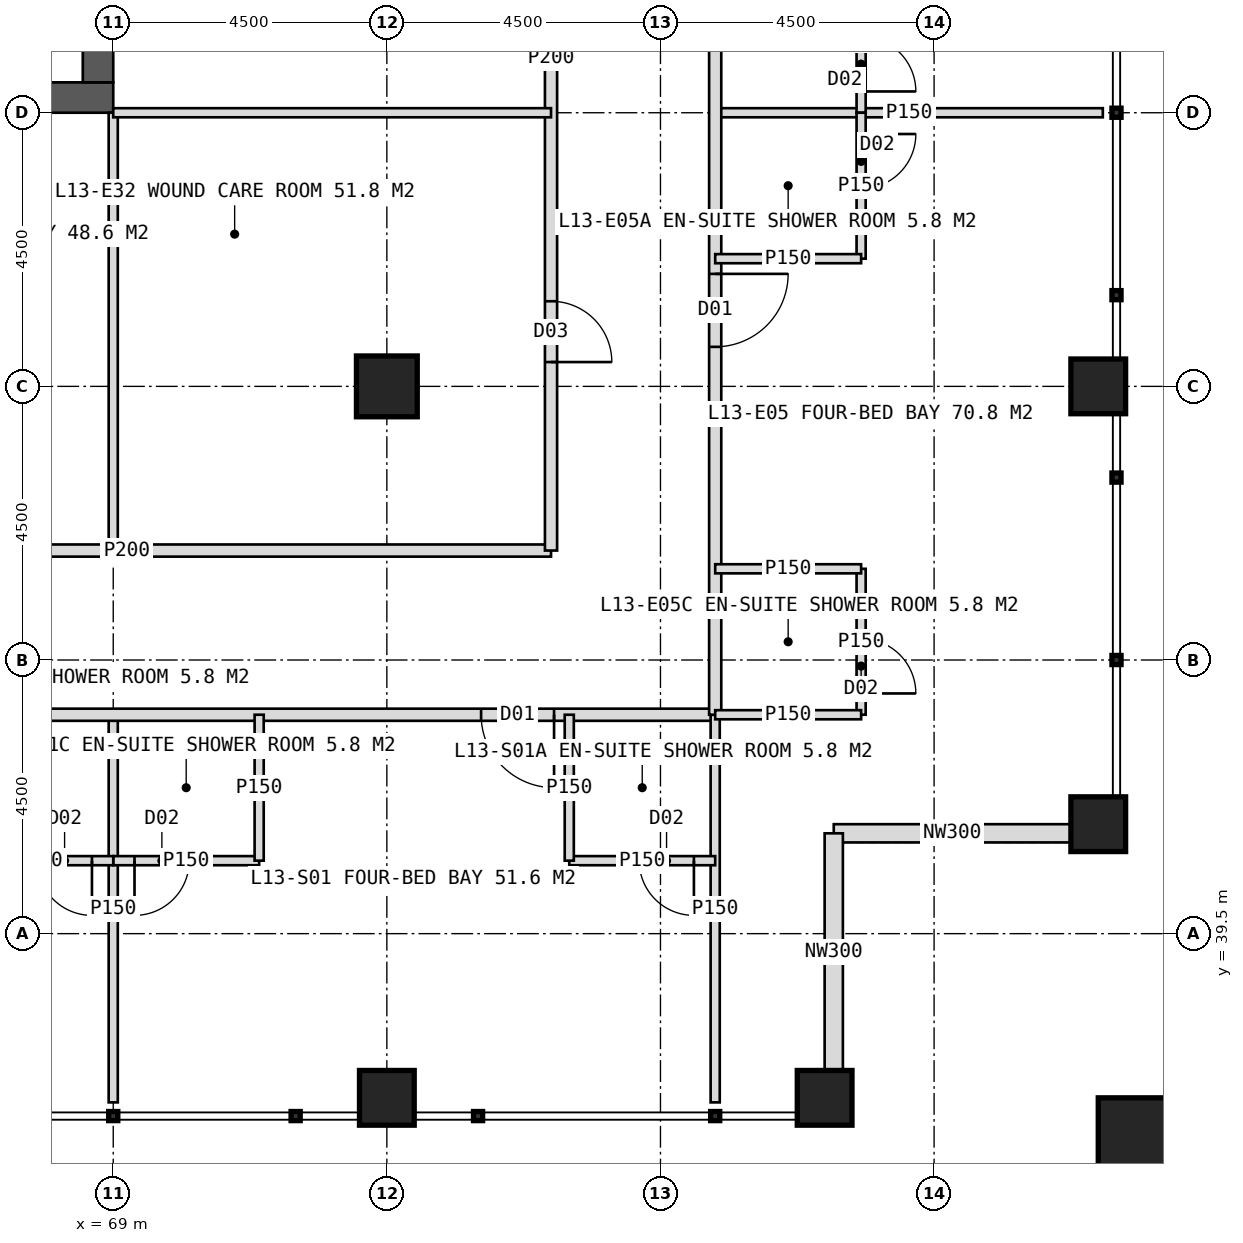
"""IFC4 building model, lengths in metres.
Left out: names, types, materials, properties, quantities, classifications, styles, units other than length and angle.
Written with IfcOpenShell. Run it as: python <this file> out.ifc"""

import sys

from ifc_helpers import new_model, si_unit, direction, frame, frame_2d, origin, origin_2d, place, context, subcontext, project, spatial, rectangle, hollow_rectangle, extrude, element, fill, save


model = new_model("IFC4")
c1 = context("Model", 3, precision=1e-05, world=origin(), true_north=direction((0.0, 1.0)))
c2 = subcontext(c1, "Body", "Model", "MODEL_VIEW")
j1 = project(units=[si_unit("LENGTHUNIT", "METRE"), si_unit("PLANEANGLEUNIT", "RADIAN")], contexts=[c1])
p1 = place(None, origin())
s1 = spatial("IfcSite", under=j1, at=p1, CompositionType="ELEMENT")
p2 = place(p1, origin())
s2 = spatial("IfcBuilding", under=s1, at=p2, CompositionType="ELEMENT")
p3 = place(p2, frame((0.0, 0.0, 59.0)))
s3 = spatial("IfcBuildingStorey", under=s2, at=p3, CompositionType="ELEMENT", Elevation=59.0)
p4 = place(p3, frame((51.0, 53.25, 0.0), z_axis=(0.0, 0.0, 1.0), x_axis=(1.0, 0.0, 0.0)))
e1 = element("IfcWall", 1, at=p4, inside=s3, PredefinedType="SHEAR", context=c2, shape_type="SweptSolid", body=[
    extrude(rectangle(XDim=18.0, YDim=0.5, at=frame_2d((9.0, 0.0))), origin(), (0.0, 0.0, 1.0), 4.0),
])
p5 = place(p4, frame((8.1, 0.0, 0.0)))
e2 = element("IfcOpeningElement", 2, at=p5, cuts=e1, PredefinedType="OPENING", context=c2, shape_type="SweptSolid", body=[
    extrude(rectangle(XDim=1.8, YDim=2.2, at=frame_2d((0.9, 1.1))), frame((0.0, 0.26, 0.0), z_axis=(0.0, -1.0, 0.0), x_axis=(1.0, 0.0, 0.0)), (0.0, 0.0, 1.0), 0.52),
])
p6 = place(p3, frame((68.75, 53.5, 0.0), z_axis=(0.0, 0.0, 1.0), x_axis=(0.0, 1.0, 0.0)))
e3 = element("IfcWall", 3, at=p6, inside=s3, PredefinedType="SHEAR", context=c2, shape_type="SweptSolid", body=[
    extrude(rectangle(XDim=17.0, YDim=0.5, at=frame_2d((8.5, 0.0))), origin(), (0.0, 0.0, 1.0), 4.0),
])
p7 = place(p6, frame((9.5, 0.0, 0.0)))
e4 = element("IfcOpeningElement", 4, at=p7, cuts=e3, PredefinedType="OPENING", context=c2, shape_type="SweptSolid", body=[
    extrude(rectangle(XDim=1.5, YDim=2.2, at=frame_2d((0.75, 1.1))), frame((0.0, 0.26, 0.0), z_axis=(0.0, -1.0, 0.0), x_axis=(1.0, 0.0, 0.0)), (0.0, 0.0, 1.0), 0.52),
])
p8 = place(p3, frame((73.5, 48.5, 0.0), z_axis=(0.0, 0.0, 1.0), x_axis=(1.0, 0.0, 0.0)))
e5 = element("IfcColumn", 5, at=p8, inside=s3, PredefinedType="COLUMN", context=c2, shape_type="SweptSolid", body=[
    extrude(hollow_rectangle(XDim=1.0, YDim=1.0, WallThickness=0.1, at=origin_2d()), origin(), (0.0, 0.0, 1.0), 4.0),
])
for number, where, z_axis, x_axis in (
    (6, (85.2, 41.3, 0.0), (0.0, 0.0, 1.0), (1.0, 0.0, 0.0)),
    (7, (85.2, 48.5, 0.0), (0.0, 0.0, 1.0), (1.0, 0.0, 0.0)),
    (8, (73.5, 36.8, 0.0), (0.0, 0.0, 1.0), (1.0, 0.0, 0.0)),
    (9, (80.7, 36.8, 0.0), (0.0, 0.0, 1.0), (1.0, 0.0, 0.0)),
):
    element("IfcColumn", number, at=place(p3, frame(where, z_axis=z_axis, x_axis=x_axis)), inside=s3, PredefinedType="COLUMN", context=c2, shape_type="SweptSolid", body=[
        extrude(hollow_rectangle(XDim=0.9, YDim=0.9, WallThickness=0.08, at=origin_2d()), origin(), (0.0, 0.0, 1.0), 4.0),
    ])
p9 = place(p3, frame((86.1, 35.9, 0.0), z_axis=(0.0, 0.0, 1.0), x_axis=(1.0, 0.0, 0.0)))
e10 = element("IfcColumn", 10, at=p9, inside=s3, PredefinedType="COLUMN", context=c2, shape_type="SweptSolid", body=[
    extrude(hollow_rectangle(XDim=1.8, YDim=1.8, WallThickness=0.1, at=origin_2d()), origin(), (0.0, 0.0, 1.0), 4.0),
])
for number, where, z_axis, x_axis in (
    (11, (84.75, 41.15, 0.0), (0.0, 0.0, 1.0), (-1.0, 0.0, 0.0)),
    (12, (80.85, 41.15, 0.0), (0.0, 0.0, 1.0), (0.0, -1.0, 0.0)),
):
    element("IfcWall", number, at=place(p3, frame(where, z_axis=z_axis, x_axis=x_axis)), inside=s3, PredefinedType="ELEMENTEDWALL", context=c2, shape_type="SweptSolid", body=[
        extrude(rectangle(XDim=3.9, YDim=0.3, at=frame_2d((1.95, 0.0))), origin(), (0.0, 0.0, 1.0), 2.95),
    ])
p10 = place(p3, frame((69.0, 43.1, 0.0), z_axis=(0.0, 0.0, 1.0), x_axis=(0.0, -1.0, 0.0)))
e13 = element("IfcWall", 13, at=p10, inside=s3, PredefinedType="PARTITIONING", context=c2, shape_type="SweptSolid", body=[
    extrude(rectangle(XDim=6.375, YDim=0.15, at=frame_2d((3.188, 0.0))), origin(), (0.0, 0.0, 1.0), 3.75),
])
p11 = place(p3, frame((78.9, 43.1, 0.0), z_axis=(0.0, 0.0, 1.0), x_axis=(-1.0, 0.0, 0.0)))
e14 = element("IfcWall", 14, at=p11, inside=s3, PredefinedType="PARTITIONING", context=c2, shape_type="SweptSolid", body=[
    extrude(rectangle(XDim=37.8, YDim=0.2, at=frame_2d((18.9, 0.0))), origin(), (0.0, 0.0, 1.0), 3.75),
])
p12 = place(p11, frame((2.65, 0.0, 0.0)))
e15 = element("IfcOpeningElement", 15, at=p12, cuts=e14, PredefinedType="OPENING", context=c2, shape_type="SweptSolid", body=[
    extrude(rectangle(XDim=1.2, YDim=2.2, at=frame_2d((0.6, 1.1))), frame((0.0, 0.11, 0.0), z_axis=(0.0, -1.0, 0.0), x_axis=(1.0, 0.0, 0.0)), (0.0, 0.0, 1.0), 0.22),
])
p13 = place(p11, frame((12.55, 0.0, 0.0)))
e16 = element("IfcOpeningElement", 16, at=p13, cuts=e14, PredefinedType="OPENING", context=c2, shape_type="SweptSolid", body=[
    extrude(rectangle(XDim=1.2, YDim=2.2, at=frame_2d((0.6, 1.1))), frame((0.0, 0.11, 0.0), z_axis=(0.0, -1.0, 0.0), x_axis=(1.0, 0.0, 0.0)), (0.0, 0.0, 1.0), 0.22),
])
p14 = place(p11, frame((21.55, 0.0, 0.0)))
e17 = element("IfcOpeningElement", 17, at=p14, cuts=e14, PredefinedType="OPENING", context=c2, shape_type="SweptSolid", body=[
    extrude(rectangle(XDim=1.2, YDim=2.2, at=frame_2d((0.6, 1.1))), frame((0.0, 0.11, 0.0), z_axis=(0.0, -1.0, 0.0), x_axis=(1.0, 0.0, 0.0)), (0.0, 0.0, 1.0), 0.22),
])
p15 = place(p11, frame((30.55, 0.0, 0.0)))
e18 = element("IfcOpeningElement", 18, at=p15, cuts=e14, PredefinedType="OPENING", context=c2, shape_type="SweptSolid", body=[
    extrude(rectangle(XDim=1.2, YDim=2.2, at=frame_2d((0.6, 1.1))), frame((0.0, 0.11, 0.0), z_axis=(0.0, -1.0, 0.0), x_axis=(1.0, 0.0, 0.0)), (0.0, 0.0, 1.0), 0.22),
])
p16 = place(p3, frame((78.9, 43.1, 0.0), z_axis=(0.0, 0.0, 1.0), x_axis=(0.0, -1.0, 0.0)))
e19 = element("IfcWall", 19, at=p16, inside=s3, PredefinedType="PARTITIONING", context=c2, shape_type="SweptSolid", body=[
    extrude(rectangle(XDim=6.375, YDim=0.15, at=frame_2d((3.188, 0.0))), origin(), (0.0, 0.0, 1.0), 3.75),
])
p17 = place(p3, frame((78.9, 40.7, 0.0), z_axis=(0.0, 0.0, 1.0), x_axis=(-1.0, 0.0, 0.0)))
e20 = element("IfcWall", 20, at=p17, inside=s3, PredefinedType="PARTITIONING", context=c2, shape_type="SweptSolid", body=[
    extrude(rectangle(XDim=2.4, YDim=0.15, at=frame_2d((1.2, 0.0))), origin(), (0.0, 0.0, 1.0), 3.75),
])
p18 = place(p17, frame((0.35, 0.0, 0.0)))
e21 = element("IfcOpeningElement", 21, at=p18, cuts=e20, PredefinedType="OPENING", context=c2, shape_type="SweptSolid", body=[
    extrude(rectangle(XDim=0.9, YDim=2.1, at=frame_2d((0.45, 1.05))), frame((0.0, 0.085, 0.0), z_axis=(0.0, -1.0, 0.0), x_axis=(1.0, 0.0, 0.0)), (0.0, 0.0, 1.0), 0.17),
])
p19 = place(p3, frame((76.5, 43.1, 0.0), z_axis=(0.0, 0.0, 1.0), x_axis=(0.0, -1.0, 0.0)))
e22 = element("IfcWall", 22, at=p19, inside=s3, PredefinedType="PARTITIONING", context=c2, shape_type="SweptSolid", body=[
    extrude(rectangle(XDim=2.4, YDim=0.15, at=frame_2d((1.2, 0.0))), origin(), (0.0, 0.0, 1.0), 3.75),
])
p20 = place(p3, frame((71.4, 40.7, 0.0), z_axis=(0.0, 0.0, 1.0), x_axis=(-1.0, 0.0, 0.0)))
e23 = element("IfcWall", 23, at=p20, inside=s3, PredefinedType="PARTITIONING", context=c2, shape_type="SweptSolid", body=[
    extrude(rectangle(XDim=2.4, YDim=0.15, at=frame_2d((1.2, 0.0))), origin(), (0.0, 0.0, 1.0), 3.75),
])
p21 = place(p20, frame((1.15, 0.0, 0.0)))
e24 = element("IfcOpeningElement", 24, at=p21, cuts=e23, PredefinedType="OPENING", context=c2, shape_type="SweptSolid", body=[
    extrude(rectangle(XDim=0.9, YDim=2.1, at=frame_2d((0.45, 1.05))), frame((0.0, 0.085, 0.0), z_axis=(0.0, -1.0, 0.0), x_axis=(1.0, 0.0, 0.0)), (0.0, 0.0, 1.0), 0.17),
])
p22 = place(p3, frame((71.4, 43.1, 0.0), z_axis=(0.0, 0.0, 1.0), x_axis=(0.0, -1.0, 0.0)))
e25 = element("IfcWall", 25, at=p22, inside=s3, PredefinedType="PARTITIONING", context=c2, shape_type="SweptSolid", body=[
    extrude(rectangle(XDim=2.4, YDim=0.15, at=frame_2d((1.2, 0.0))), origin(), (0.0, 0.0, 1.0), 3.75),
])
p23 = place(p3, frame((69.0, 40.7, 0.0), z_axis=(0.0, 0.0, 1.0), x_axis=(-1.0, 0.0, 0.0)))
e26 = element("IfcWall", 26, at=p23, inside=s3, PredefinedType="PARTITIONING", context=c2, shape_type="SweptSolid", body=[
    extrude(rectangle(XDim=2.4, YDim=0.15, at=frame_2d((1.2, 0.0))), origin(), (0.0, 0.0, 1.0), 3.75),
])
p24 = place(p23, frame((0.35, 0.0, 0.0)))
e27 = element("IfcOpeningElement", 27, at=p24, cuts=e26, PredefinedType="OPENING", context=c2, shape_type="SweptSolid", body=[
    extrude(rectangle(XDim=0.9, YDim=2.1, at=frame_2d((0.45, 1.05))), frame((0.0, 0.085, 0.0), z_axis=(0.0, -1.0, 0.0), x_axis=(1.0, 0.0, 0.0)), (0.0, 0.0, 1.0), 0.17),
])
p25 = place(p3, frame((69.0, 53.0, 0.0), z_axis=(0.0, 0.0, 1.0), x_axis=(0.0, -1.0, 0.0)))
e28 = element("IfcWall", 28, at=p25, inside=s3, PredefinedType="PARTITIONING", context=c2, shape_type="SweptSolid", body=[
    extrude(rectangle(XDim=7.2, YDim=0.15, at=frame_2d((3.6, 0.0))), origin(), (0.0, 0.0, 1.0), 3.75),
])
p26 = place(p3, frame((76.2, 45.8, 0.0), z_axis=(0.0, 0.0, 1.0), x_axis=(-1.0, 0.0, 0.0)))
e29 = element("IfcWall", 29, at=p26, inside=s3, PredefinedType="PARTITIONING", context=c2, shape_type="SweptSolid", body=[
    extrude(rectangle(XDim=13.95, YDim=0.2, at=frame_2d((6.975, 0.0))), origin(), (0.0, 0.0, 1.0), 3.75),
])
p27 = place(p26, frame((10.075, 0.0, 0.0)))
e30 = element("IfcOpeningElement", 30, at=p27, cuts=e29, PredefinedType="OPENING", context=c2, shape_type="SweptSolid", body=[
    extrude(rectangle(XDim=1.0, YDim=2.1, at=frame_2d((0.5, 1.05))), frame((0.0, 0.11, 0.0), z_axis=(0.0, -1.0, 0.0), x_axis=(1.0, 0.0, 0.0)), (0.0, 0.0, 1.0), 0.22),
])
p28 = place(p3, frame((78.9, 53.0, 0.0), z_axis=(0.0, 0.0, 1.0), x_axis=(1.0, 0.0, 0.0)))
e31 = element("IfcWall", 31, at=p28, inside=s3, PredefinedType="PARTITIONING", context=c2, shape_type="SweptSolid", body=[
    extrude(rectangle(XDim=6.375, YDim=0.15, at=frame_2d((3.188, 0.0))), origin(), (0.0, 0.0, 1.0), 3.75),
])
p29 = place(p3, frame((78.9, 80.9, 0.0), z_axis=(0.0, 0.0, 1.0), x_axis=(0.0, -1.0, 0.0)))
e32 = element("IfcWall", 32, at=p29, inside=s3, PredefinedType="PARTITIONING", context=c2, shape_type="SweptSolid", body=[
    extrude(rectangle(XDim=37.8, YDim=0.2, at=frame_2d((18.9, 0.0))), origin(), (0.0, 0.0, 1.0), 3.75),
])
p30 = place(p29, frame((3.25, 0.0, 0.0)))
e33 = element("IfcOpeningElement", 33, at=p30, cuts=e32, PredefinedType="OPENING", context=c2, shape_type="SweptSolid", body=[
    extrude(rectangle(XDim=1.2, YDim=2.2, at=frame_2d((0.6, 1.1))), frame((0.0, 0.11, 0.0), z_axis=(0.0, -1.0, 0.0), x_axis=(1.0, 0.0, 0.0)), (0.0, 0.0, 1.0), 0.22),
])
p31 = place(p29, frame((9.55, 0.0, 0.0)))
e34 = element("IfcOpeningElement", 34, at=p31, cuts=e32, PredefinedType="OPENING", context=c2, shape_type="SweptSolid", body=[
    extrude(rectangle(XDim=1.2, YDim=2.2, at=frame_2d((0.6, 1.1))), frame((0.0, 0.11, 0.0), z_axis=(0.0, -1.0, 0.0), x_axis=(1.0, 0.0, 0.0)), (0.0, 0.0, 1.0), 0.22),
])
p32 = place(p29, frame((15.55, 0.0, 0.0)))
e35 = element("IfcOpeningElement", 35, at=p32, cuts=e32, PredefinedType="OPENING", context=c2, shape_type="SweptSolid", body=[
    extrude(rectangle(XDim=1.2, YDim=2.2, at=frame_2d((0.6, 1.1))), frame((0.0, 0.11, 0.0), z_axis=(0.0, -1.0, 0.0), x_axis=(1.0, 0.0, 0.0)), (0.0, 0.0, 1.0), 0.22),
])
p33 = place(p29, frame((21.55, 0.0, 0.0)))
e36 = element("IfcOpeningElement", 36, at=p33, cuts=e32, PredefinedType="OPENING", context=c2, shape_type="SweptSolid", body=[
    extrude(rectangle(XDim=1.2, YDim=2.2, at=frame_2d((0.6, 1.1))), frame((0.0, 0.11, 0.0), z_axis=(0.0, -1.0, 0.0), x_axis=(1.0, 0.0, 0.0)), (0.0, 0.0, 1.0), 0.22),
])
p34 = place(p29, frame((30.55, 0.0, 0.0)))
e37 = element("IfcOpeningElement", 37, at=p34, cuts=e32, PredefinedType="OPENING", context=c2, shape_type="SweptSolid", body=[
    extrude(rectangle(XDim=1.2, YDim=2.2, at=frame_2d((0.6, 1.1))), frame((0.0, 0.11, 0.0), z_axis=(0.0, -1.0, 0.0), x_axis=(1.0, 0.0, 0.0)), (0.0, 0.0, 1.0), 0.22),
])
p35 = place(p3, frame((81.3, 55.4, 0.0), z_axis=(0.0, 0.0, 1.0), x_axis=(0.0, -1.0, 0.0)))
e38 = element("IfcWall", 38, at=p35, inside=s3, PredefinedType="PARTITIONING", context=c2, shape_type="SweptSolid", body=[
    extrude(rectangle(XDim=2.4, YDim=0.15, at=frame_2d((1.2, 0.0))), origin(), (0.0, 0.0, 1.0), 3.75),
])
p36 = place(p35, frame((1.15, 0.0, 0.0)))
e39 = element("IfcOpeningElement", 39, at=p36, cuts=e38, PredefinedType="OPENING", context=c2, shape_type="SweptSolid", body=[
    extrude(rectangle(XDim=0.9, YDim=2.1, at=frame_2d((0.45, 1.05))), frame((0.0, 0.085, 0.0), z_axis=(0.0, -1.0, 0.0), x_axis=(1.0, 0.0, 0.0)), (0.0, 0.0, 1.0), 0.17),
])
p37 = place(p3, frame((81.3, 53.0, 0.0), z_axis=(0.0, 0.0, 1.0), x_axis=(0.0, -1.0, 0.0)))
e40 = element("IfcWall", 40, at=p37, inside=s3, PredefinedType="PARTITIONING", context=c2, shape_type="SweptSolid", body=[
    extrude(rectangle(XDim=2.4, YDim=0.15, at=frame_2d((1.2, 0.0))), origin(), (0.0, 0.0, 1.0), 3.75),
])
p38 = place(p37, frame((0.35, 0.0, 0.0)))
e41 = element("IfcOpeningElement", 41, at=p38, cuts=e40, PredefinedType="OPENING", context=c2, shape_type="SweptSolid", body=[
    extrude(rectangle(XDim=0.9, YDim=2.1, at=frame_2d((0.45, 1.05))), frame((0.0, 0.085, 0.0), z_axis=(0.0, -1.0, 0.0), x_axis=(1.0, 0.0, 0.0)), (0.0, 0.0, 1.0), 0.17),
])
p39 = place(p3, frame((78.9, 50.6, 0.0), z_axis=(0.0, 0.0, 1.0), x_axis=(1.0, 0.0, 0.0)))
e42 = element("IfcWall", 42, at=p39, inside=s3, PredefinedType="PARTITIONING", context=c2, shape_type="SweptSolid", body=[
    extrude(rectangle(XDim=2.4, YDim=0.15, at=frame_2d((1.2, 0.0))), origin(), (0.0, 0.0, 1.0), 3.75),
])
p40 = place(p3, frame((81.3, 45.5, 0.0), z_axis=(0.0, 0.0, 1.0), x_axis=(0.0, -1.0, 0.0)))
e43 = element("IfcWall", 43, at=p40, inside=s3, PredefinedType="PARTITIONING", context=c2, shape_type="SweptSolid", body=[
    extrude(rectangle(XDim=2.4, YDim=0.15, at=frame_2d((1.2, 0.0))), origin(), (0.0, 0.0, 1.0), 3.75),
])
p41 = place(p40, frame((1.15, 0.0, 0.0)))
e44 = element("IfcOpeningElement", 44, at=p41, cuts=e43, PredefinedType="OPENING", context=c2, shape_type="SweptSolid", body=[
    extrude(rectangle(XDim=0.9, YDim=2.1, at=frame_2d((0.45, 1.05))), frame((0.0, 0.085, 0.0), z_axis=(0.0, -1.0, 0.0), x_axis=(1.0, 0.0, 0.0)), (0.0, 0.0, 1.0), 0.17),
])
for number, where, z_axis, x_axis in (
    (45, (78.9, 45.5, 0.0), (0.0, 0.0, 1.0), (1.0, 0.0, 0.0)),
    (46, (78.9, 43.1, 0.0), (0.0, 0.0, 1.0), (1.0, 0.0, 0.0)),
):
    element("IfcWall", number, at=place(p3, frame(where, z_axis=z_axis, x_axis=x_axis)), inside=s3, PredefinedType="PARTITIONING", context=c2, shape_type="SweptSolid", body=[
        extrude(rectangle(XDim=2.4, YDim=0.15, at=frame_2d((1.2, 0.0))), origin(), (0.0, 0.0, 1.0), 3.75),
    ])
p42 = place(p3, frame((76.2, 62.0, 0.0), z_axis=(0.0, 0.0, 1.0), x_axis=(0.0, -1.0, 0.0)))
e47 = element("IfcWall", 47, at=p42, inside=s3, PredefinedType="PARTITIONING", context=c2, shape_type="SweptSolid", body=[
    extrude(rectangle(XDim=16.2, YDim=0.2, at=frame_2d((8.1, 0.0))), origin(), (0.0, 0.0, 1.0), 3.75),
])
p43 = place(p42, frame((4.0, 0.0, 0.0)))
e48 = element("IfcOpeningElement", 48, at=p43, cuts=e47, PredefinedType="OPENING", context=c2, shape_type="SweptSolid", body=[
    extrude(rectangle(XDim=1.0, YDim=2.1, at=frame_2d((0.5, 1.05))), frame((0.0, 0.11, 0.0), z_axis=(0.0, -1.0, 0.0), x_axis=(1.0, 0.0, 0.0)), (0.0, 0.0, 1.0), 0.22),
])
p44 = place(p42, frame((12.1, 0.0, 0.0)))
e49 = element("IfcOpeningElement", 49, at=p44, cuts=e47, PredefinedType="OPENING", context=c2, shape_type="SweptSolid", body=[
    extrude(rectangle(XDim=1.0, YDim=2.1, at=frame_2d((0.5, 1.05))), frame((0.0, 0.11, 0.0), z_axis=(0.0, -1.0, 0.0), x_axis=(1.0, 0.0, 0.0)), (0.0, 0.0, 1.0), 0.22),
])
p45 = place(p3, frame((69.0, 53.0, 0.0), z_axis=(0.0, 0.0, 1.0), x_axis=(1.0, 0.0, 0.0)))
e50 = element("IfcWall", 50, at=p45, inside=s3, PredefinedType="PARTITIONING", context=c2, shape_type="SweptSolid", body=[
    extrude(rectangle(XDim=7.2, YDim=0.15, at=frame_2d((3.6, 0.0))), origin(), (0.0, 0.0, 1.0), 3.75),
])
p46 = place(p12, origin())
e51 = element("IfcDoor", 51, at=p46, inside=s3, OperationType="SINGLE_SWING_LEFT", PredefinedType="DOOR", context=c2, shape_type="SweptSolid", body=[
    extrude(rectangle(XDim=1.2, YDim=2.2, at=frame_2d((0.6, 1.1))), frame((0.0, 0.025, 0.0), z_axis=(0.0, -1.0, 0.0), x_axis=(1.0, 0.0, 0.0)), (0.0, 0.0, 1.0), 0.05),
])
fill(e15, e51)
p47 = place(p18, origin())
e52 = element("IfcDoor", 52, at=p47, inside=s3, OperationType="SINGLE_SWING_LEFT", PredefinedType="DOOR", context=c2, shape_type="SweptSolid", body=[
    extrude(rectangle(XDim=0.9, YDim=2.1, at=frame_2d((0.45, 1.05))), frame((0.0, 0.025, 0.0), z_axis=(0.0, -1.0, 0.0), x_axis=(1.0, 0.0, 0.0)), (0.0, 0.0, 1.0), 0.05),
])
fill(e21, e52)
p48 = place(p21, origin())
e53 = element("IfcDoor", 53, at=p48, inside=s3, OperationType="SINGLE_SWING_RIGHT", PredefinedType="DOOR", context=c2, shape_type="SweptSolid", body=[
    extrude(rectangle(XDim=0.9, YDim=2.1, at=frame_2d((0.45, 1.05))), frame((0.0, 0.025, 0.0), z_axis=(0.0, -1.0, 0.0), x_axis=(1.0, 0.0, 0.0)), (0.0, 0.0, 1.0), 0.05),
])
fill(e24, e53)
p49 = place(p24, origin())
e54 = element("IfcDoor", 54, at=p49, inside=s3, OperationType="SINGLE_SWING_LEFT", PredefinedType="DOOR", context=c2, shape_type="SweptSolid", body=[
    extrude(rectangle(XDim=0.9, YDim=2.1, at=frame_2d((0.45, 1.05))), frame((0.0, 0.025, 0.0), z_axis=(0.0, -1.0, 0.0), x_axis=(1.0, 0.0, 0.0)), (0.0, 0.0, 1.0), 0.05),
])
fill(e27, e54)
p50 = place(p36, origin())
e55 = element("IfcDoor", 55, at=p50, inside=s3, OperationType="SINGLE_SWING_RIGHT", PredefinedType="DOOR", context=c2, shape_type="SweptSolid", body=[
    extrude(rectangle(XDim=0.9, YDim=2.1, at=frame_2d((0.45, 1.05))), frame((0.0, 0.025, 0.0), z_axis=(0.0, -1.0, 0.0), x_axis=(1.0, 0.0, 0.0)), (0.0, 0.0, 1.0), 0.05),
])
fill(e39, e55)
p51 = place(p34, origin())
e56 = element("IfcDoor", 56, at=p51, inside=s3, OperationType="SINGLE_SWING_LEFT", PredefinedType="DOOR", context=c2, shape_type="SweptSolid", body=[
    extrude(rectangle(XDim=1.2, YDim=2.2, at=frame_2d((0.6, 1.1))), frame((0.0, 0.025, 0.0), z_axis=(0.0, -1.0, 0.0), x_axis=(1.0, 0.0, 0.0)), (0.0, 0.0, 1.0), 0.05),
])
fill(e37, e56)
p52 = place(p38, origin())
e57 = element("IfcDoor", 57, at=p52, inside=s3, OperationType="SINGLE_SWING_LEFT", PredefinedType="DOOR", context=c2, shape_type="SweptSolid", body=[
    extrude(rectangle(XDim=0.9, YDim=2.1, at=frame_2d((0.45, 1.05))), frame((0.0, 0.025, 0.0), z_axis=(0.0, -1.0, 0.0), x_axis=(1.0, 0.0, 0.0)), (0.0, 0.0, 1.0), 0.05),
])
fill(e41, e57)
p53 = place(p41, origin())
e58 = element("IfcDoor", 58, at=p53, inside=s3, OperationType="SINGLE_SWING_RIGHT", PredefinedType="DOOR", context=c2, shape_type="SweptSolid", body=[
    extrude(rectangle(XDim=0.9, YDim=2.1, at=frame_2d((0.45, 1.05))), frame((0.0, 0.025, 0.0), z_axis=(0.0, -1.0, 0.0), x_axis=(1.0, 0.0, 0.0)), (0.0, 0.0, 1.0), 0.05),
])
fill(e44, e58)
p54 = place(p44, origin())
e59 = element("IfcDoor", 59, at=p54, inside=s3, OperationType="SINGLE_SWING_RIGHT", PredefinedType="DOOR", context=c2, shape_type="SweptSolid", body=[
    extrude(rectangle(XDim=1.0, YDim=2.1, at=frame_2d((0.5, 1.05))), frame((0.0, 0.025, 0.0), z_axis=(0.0, -1.0, 0.0), x_axis=(1.0, 0.0, 0.0)), (0.0, 0.0, 1.0), 0.05),
])
fill(e49, e59)
save(model, sys.argv[1])
